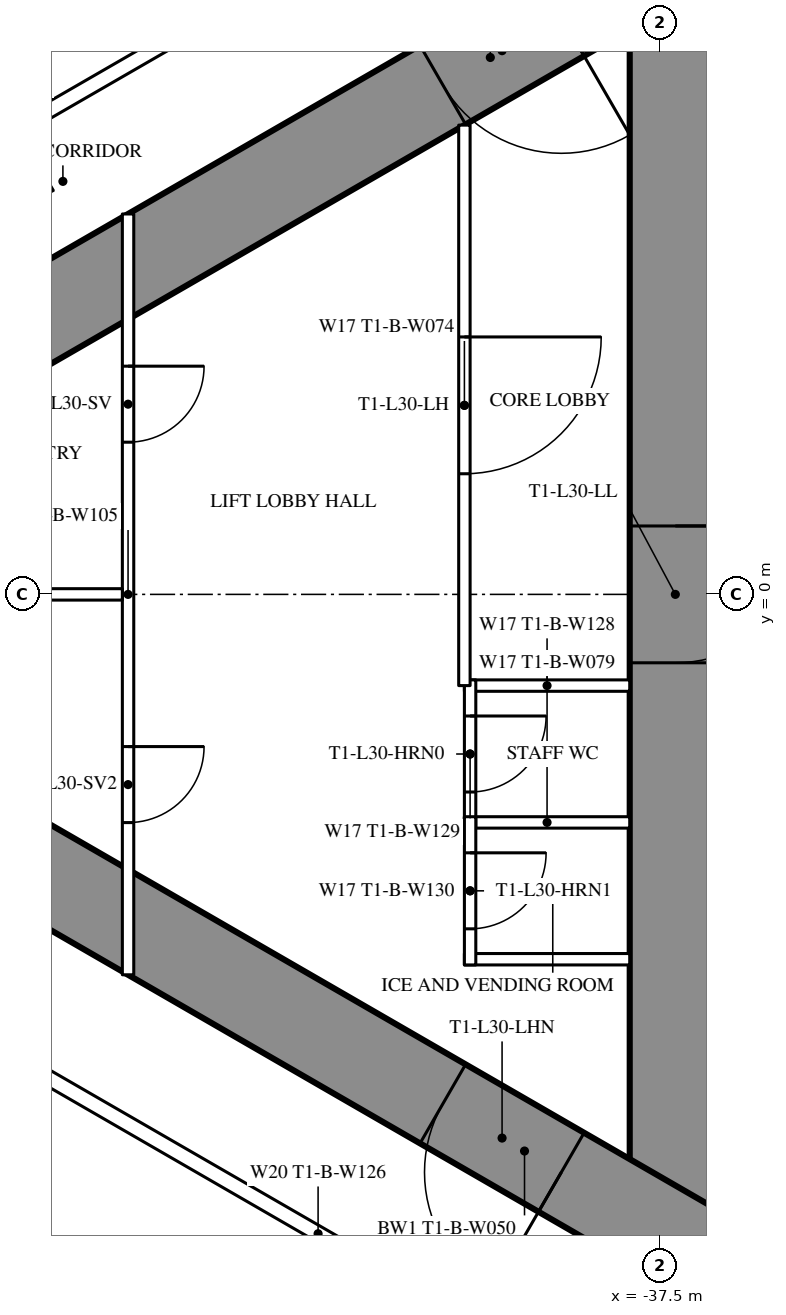
"""IFC4 building model, lengths in metres.
Left out: names, types, materials, properties, quantities, classifications, styles, units other than length and angle.
Written with IfcOpenShell. Run it as: python <this file> out.ifc"""

import sys

from ifc_helpers import new_model, si_unit, direction, frame, frame_2d, origin, place, context, subcontext, project, spatial, rectangle, extrude, element, fill, save


model = new_model("IFC4")
c1 = context("Model", 3, precision=1e-05, world=origin(), true_north=direction((0.0, 1.0)))
c2 = subcontext(c1, "Body", "Model", "MODEL_VIEW")
j1 = project(units=[si_unit("LENGTHUNIT", "METRE"), si_unit("PLANEANGLEUNIT", "RADIAN")], contexts=[c1])
p1 = place(None, origin())
s1 = spatial("IfcSite", under=j1, at=p1, CompositionType="ELEMENT")
p2 = place(p1, origin())
s2 = spatial("IfcBuilding", under=s1, at=p2, CompositionType="ELEMENT")
p3 = place(p2, frame((0.0, 0.0, 115.1)))
s3 = spatial("IfcBuildingStorey", under=s2, at=p3, CompositionType="ELEMENT", Elevation=115.1)
p4 = place(p3, frame((-37.3, 8.6, 0.0), z_axis=(0.0, 0.0, 1.0), x_axis=(0.0, -1.0, 0.0)))
e1 = element("IfcWall", 1, at=p4, inside=s3, PredefinedType="SHEAR", context=c2, shape_type="SweptSolid", body=[
    extrude(rectangle(XDim=17.2, YDim=1.2, at=frame_2d((8.6, 0.0))), origin(), (0.0, 0.0, 1.0), 3.5),
])
p5 = place(p4, frame((7.7, 0.0, 0.0)))
e2 = element("IfcOpeningElement", 2, at=p5, cuts=e1, PredefinedType="OPENING", context=c2, shape_type="SweptSolid", body=[
    extrude(rectangle(XDim=1.8, YDim=2.2, at=frame_2d((0.9, 1.1))), frame((0.0, 0.61, 0.0), z_axis=(0.0, -1.0, 0.0), x_axis=(1.0, 0.0, 0.0)), (0.0, 0.0, 1.0), 1.22),
])
p6 = place(p3, frame((-27.2, 14.3, 0.0), z_axis=(0.0, 0.0, 1.0), x_axis=(-0.866026593062, -0.499997940104, 0.0)))
e3 = element("IfcWall", 3, at=p6, inside=s3, PredefinedType="SHEAR", context=c2, shape_type="SweptSolid", body=[
    extrude(rectangle(XDim=28.946, YDim=1.2, at=frame_2d((14.473, 0.0))), origin(), (0.0, 0.0, 1.0), 3.5),
])
p7 = place(p6, frame((4.6, 0.0, 0.0)))
e4 = element("IfcOpeningElement", 4, at=p7, cuts=e3, PredefinedType="OPENING", context=c2, shape_type="SweptSolid", body=[
    extrude(rectangle(XDim=1.0, YDim=2.2, at=frame_2d((0.5, 1.1))), frame((0.0, 0.61, 0.0), z_axis=(0.0, -1.0, 0.0), x_axis=(1.0, 0.0, 0.0)), (0.0, 0.0, 1.0), 1.22),
])
p8 = place(p6, frame((13.395, 0.0, 0.0)))
e5 = element("IfcOpeningElement", 5, at=p8, cuts=e3, PredefinedType="OPENING", context=c2, shape_type="SweptSolid", body=[
    extrude(rectangle(XDim=1.8, YDim=2.2, at=frame_2d((0.9, 1.1))), frame((0.0, 0.61, 0.0), z_axis=(0.0, -1.0, 0.0), x_axis=(1.0, 0.0, 0.0)), (0.0, 0.0, 1.0), 1.22),
])
p9 = place(p3, frame((-27.2, -14.3, 0.0), z_axis=(0.0, 0.0, 1.0), x_axis=(-0.866024021859, 0.500002393557, 0.0)))
e6 = element("IfcWall", 6, at=p9, inside=s3, PredefinedType="SHEAR", context=c2, shape_type="SweptSolid", body=[
    extrude(rectangle(XDim=27.907, YDim=1.2, at=frame_2d((13.954, 0.0))), origin(), (0.0, 0.0, 1.0), 3.5),
])
p10 = place(p9, frame((4.6, 0.0, 0.0)))
e7 = element("IfcOpeningElement", 7, at=p10, cuts=e6, PredefinedType="OPENING", context=c2, shape_type="SweptSolid", body=[
    extrude(rectangle(XDim=1.0, YDim=2.2, at=frame_2d((0.5, 1.1))), frame((0.0, 0.61, 0.0), z_axis=(0.0, -1.0, 0.0), x_axis=(1.0, 0.0, 0.0)), (0.0, 0.0, 1.0), 1.22),
])
p11 = place(p9, frame((13.395, 0.0, 0.0)))
e8 = element("IfcOpeningElement", 8, at=p11, cuts=e6, PredefinedType="OPENING", context=c2, shape_type="SweptSolid", body=[
    extrude(rectangle(XDim=1.8, YDim=2.2, at=frame_2d((0.9, 1.1))), frame((0.0, 0.61, 0.0), z_axis=(0.0, -1.0, 0.0), x_axis=(1.0, 0.0, 0.0)), (0.0, 0.0, 1.0), 1.22),
])
p12 = place(p3, frame((-37.7, 10.894, 0.0), z_axis=(0.0, 0.0, 1.0), x_axis=(-0.866027905338, -0.499995667157, 0.0)))
e9 = element("IfcWall", 9, at=p12, inside=s3, PredefinedType="PARTITIONING", context=c2, shape_type="SweptSolid", body=[
    extrude(rectangle(XDim=21.787, YDim=0.2, at=frame_2d((10.894, 0.0))), origin(), (0.0, 0.0, 1.0), 3.25),
])
p13 = place(p12, frame((11.23, 0.0, 0.0)))
e10 = element("IfcOpeningElement", 10, at=p13, cuts=e9, PredefinedType="OPENING", context=c2, shape_type="SweptSolid", body=[
    extrude(rectangle(XDim=0.95, YDim=2.2, at=frame_2d((0.475, 1.1))), frame((0.0, 0.11, 0.0), z_axis=(0.0, -1.0, 0.0), x_axis=(1.0, 0.0, 0.0)), (0.0, 0.0, 1.0), 0.22),
])
p14 = place(p12, frame((9.531, 0.0, 0.0)))
e11 = element("IfcOpeningElement", 11, at=p14, cuts=e9, PredefinedType="OPENING", context=c2, shape_type="SweptSolid", body=[
    extrude(rectangle(XDim=0.95, YDim=2.2, at=frame_2d((0.475, 1.1))), frame((0.0, 0.11, 0.0), z_axis=(0.0, -1.0, 0.0), x_axis=(1.0, 0.0, 0.0)), (0.0, 0.0, 1.0), 0.22),
])
p15 = place(p3, frame((-36.92, -11.344, 0.0), z_axis=(0.0, 0.0, 1.0), x_axis=(-0.866027897759, 0.499995680284, 0.0)))
e12 = element("IfcWall", 12, at=p15, inside=s3, PredefinedType="PARTITIONING", context=c2, shape_type="SweptSolid", body=[
    extrude(rectangle(XDim=11.731, YDim=0.2, at=frame_2d((5.865, 0.0))), origin(), (0.0, 0.0, 1.0), 3.25),
])
p16 = place(p15, frame((3.35, 0.0, 0.0)))
e13 = element("IfcOpeningElement", 13, at=p16, cuts=e12, PredefinedType="OPENING", context=c2, shape_type="SweptSolid", body=[
    extrude(rectangle(XDim=1.0, YDim=2.2, at=frame_2d((0.5, 1.1))), frame((0.0, 0.11, 0.0), z_axis=(0.0, -1.0, 0.0), x_axis=(1.0, 0.0, 0.0)), (0.0, 0.0, 1.0), 0.22),
])
for number, where, z_axis, x_axis in (
    (14, (-37.9, -1.2, 0.0), (0.0, 0.0, 1.0), (-1.0, 0.0, 0.0)),
    (15, (-37.9, -3.0, 0.0), (0.0, 0.0, 1.0), (-1.0, 0.0, 0.0)),
    (16, (-37.9, -4.8, 0.0), (0.0, 0.0, 1.0), (-1.0, 0.0, 0.0)),
):
    element("IfcWall", number, at=place(p3, frame(where, z_axis=z_axis, x_axis=x_axis)), inside=s3, PredefinedType="PARTITIONING", context=c2, shape_type="SweptSolid", body=[
        extrude(rectangle(XDim=2.175, YDim=0.15, at=frame_2d((1.087, 0.0))), origin(), (0.0, 0.0, 1.0), 3.25),
    ])
p17 = place(p3, frame((-40.0, -1.125, 0.0), z_axis=(0.0, 0.0, 1.0), x_axis=(0.0, -1.0, 0.0)))
e17 = element("IfcWall", 17, at=p17, inside=s3, PredefinedType="PARTITIONING", context=c2, shape_type="SweptSolid", body=[
    extrude(rectangle(XDim=1.95, YDim=0.15, at=frame_2d((0.975, 0.0))), origin(), (0.0, 0.0, 1.0), 3.25),
])
p18 = place(p17, frame((0.475, 0.0, 0.0)))
e18 = element("IfcOpeningElement", 18, at=p18, cuts=e17, PredefinedType="OPENING", context=c2, shape_type="SweptSolid", body=[
    extrude(rectangle(XDim=1.0, YDim=2.2, at=frame_2d((0.5, 1.1))), frame((0.0, 0.085, 0.0), z_axis=(0.0, -1.0, 0.0), x_axis=(1.0, 0.0, 0.0)), (0.0, 0.0, 1.0), 0.17),
])
p19 = place(p3, frame((-40.0, -2.925, 0.0), z_axis=(0.0, 0.0, 1.0), x_axis=(0.0, -1.0, 0.0)))
e19 = element("IfcWall", 19, at=p19, inside=s3, PredefinedType="PARTITIONING", context=c2, shape_type="SweptSolid", body=[
    extrude(rectangle(XDim=1.95, YDim=0.15, at=frame_2d((0.975, 0.0))), origin(), (0.0, 0.0, 1.0), 3.25),
])
p20 = place(p19, frame((0.475, 0.0, 0.0)))
e20 = element("IfcOpeningElement", 20, at=p20, cuts=e19, PredefinedType="OPENING", context=c2, shape_type="SweptSolid", body=[
    extrude(rectangle(XDim=1.0, YDim=2.2, at=frame_2d((0.5, 1.1))), frame((0.0, 0.085, 0.0), z_axis=(0.0, -1.0, 0.0), x_axis=(1.0, 0.0, 0.0)), (0.0, 0.0, 1.0), 0.17),
])
p21 = place(p3, frame((-40.075, 6.174, 0.0), z_axis=(0.0, 0.0, 1.0), x_axis=(0.0, -1.0, 0.0)))
e21 = element("IfcWall", 21, at=p21, inside=s3, PredefinedType="PARTITIONING", context=c2, shape_type="SweptSolid", body=[
    extrude(rectangle(XDim=7.374, YDim=0.15, at=frame_2d((3.687, 0.0))), origin(), (0.0, 0.0, 1.0), 3.25),
])
p22 = place(p21, frame((2.787, 0.0, 0.0)))
e22 = element("IfcOpeningElement", 22, at=p22, cuts=e21, PredefinedType="OPENING", context=c2, shape_type="SweptSolid", body=[
    extrude(rectangle(XDim=1.8, YDim=2.2, at=frame_2d((0.9, 1.1))), frame((0.0, 0.085, 0.0), z_axis=(0.0, -1.0, 0.0), x_axis=(1.0, 0.0, 0.0)), (0.0, 0.0, 1.0), 0.17),
])
p23 = place(p3, frame((-44.5, 5.005, 0.0), z_axis=(0.0, 0.0, 1.0), x_axis=(0.0, -1.0, 0.0)))
e23 = element("IfcWall", 23, at=p23, inside=s3, PredefinedType="PARTITIONING", context=c2, shape_type="SweptSolid", body=[
    extrude(rectangle(XDim=10.009, YDim=0.15, at=frame_2d((5.005, 0.0))), origin(), (0.0, 0.0, 1.0), 2.45),
])
p24 = place(p23, frame((2.002, 0.0, 0.0)))
e24 = element("IfcOpeningElement", 24, at=p24, cuts=e23, PredefinedType="OPENING", context=c2, shape_type="SweptSolid", body=[
    extrude(rectangle(XDim=1.0, YDim=2.2, at=frame_2d((0.5, 1.1))), frame((0.0, 0.085, 0.0), z_axis=(0.0, -1.0, 0.0), x_axis=(1.0, 0.0, 0.0)), (0.0, 0.0, 1.0), 0.17),
])
p25 = place(p23, frame((7.007, 0.0, 0.0)))
e25 = element("IfcOpeningElement", 25, at=p25, cuts=e23, PredefinedType="OPENING", context=c2, shape_type="SweptSolid", body=[
    extrude(rectangle(XDim=1.0, YDim=2.2, at=frame_2d((0.5, 1.1))), frame((0.0, 0.085, 0.0), z_axis=(0.0, -1.0, 0.0), x_axis=(1.0, 0.0, 0.0)), (0.0, 0.0, 1.0), 0.17),
])
p26 = place(p3, frame((-44.575, 0.0, 0.0), z_axis=(0.0, 0.0, 1.0), x_axis=(-1.0, 0.0, 0.0)))
e26 = element("IfcWall", 26, at=p26, inside=s3, PredefinedType="PARTITIONING", context=c2, shape_type="SweptSolid", body=[
    extrude(rectangle(XDim=8.593, YDim=0.15, at=frame_2d((4.297, 0.0))), origin(), (0.0, 0.0, 1.0), 2.2),
])
p27 = place(p18, origin())
e27 = element("IfcDoor", 27, at=p27, inside=s3, OperationType="SINGLE_SWING_LEFT", PredefinedType="DOOR", context=c2, shape_type="SweptSolid", body=[
    extrude(rectangle(XDim=1.0, YDim=2.2, at=frame_2d((0.5, 1.1))), frame((0.0, 0.025, 0.0), z_axis=(0.0, -1.0, 0.0), x_axis=(1.0, 0.0, 0.0)), (0.0, 0.0, 1.0), 0.05),
])
fill(e18, e27)
p28 = place(p20, origin())
e28 = element("IfcDoor", 28, at=p28, inside=s3, OperationType="SINGLE_SWING_LEFT", PredefinedType="DOOR", context=c2, shape_type="SweptSolid", body=[
    extrude(rectangle(XDim=1.0, YDim=2.2, at=frame_2d((0.5, 1.1))), frame((0.0, 0.025, 0.0), z_axis=(0.0, -1.0, 0.0), x_axis=(1.0, 0.0, 0.0)), (0.0, 0.0, 1.0), 0.05),
])
fill(e20, e28)
p29 = place(p22, origin())
e29 = element("IfcDoor", 29, at=p29, inside=s3, OperationType="DOUBLE_DOOR_SINGLE_SWING", PredefinedType="DOOR", context=c2, shape_type="SweptSolid", body=[
    extrude(rectangle(XDim=1.8, YDim=2.2, at=frame_2d((0.9, 1.1))), frame((0.0, 0.025, 0.0), z_axis=(0.0, -1.0, 0.0), x_axis=(1.0, 0.0, 0.0)), (0.0, 0.0, 1.0), 0.05),
])
fill(e22, e29)
p30 = place(p24, origin())
e30 = element("IfcDoor", 30, at=p30, inside=s3, OperationType="SINGLE_SWING_LEFT", PredefinedType="DOOR", context=c2, shape_type="SweptSolid", body=[
    extrude(rectangle(XDim=1.0, YDim=2.2, at=frame_2d((0.5, 1.1))), frame((0.0, 0.025, 0.0), z_axis=(0.0, -1.0, 0.0), x_axis=(1.0, 0.0, 0.0)), (0.0, 0.0, 1.0), 0.05),
])
fill(e24, e30)
p31 = place(p25, origin())
e31 = element("IfcDoor", 31, at=p31, inside=s3, OperationType="SINGLE_SWING_LEFT", PredefinedType="DOOR", context=c2, shape_type="SweptSolid", body=[
    extrude(rectangle(XDim=1.0, YDim=2.2, at=frame_2d((0.5, 1.1))), frame((0.0, 0.025, 0.0), z_axis=(0.0, -1.0, 0.0), x_axis=(1.0, 0.0, 0.0)), (0.0, 0.0, 1.0), 0.05),
])
fill(e25, e31)
p32 = place(p8, origin())
e32 = element("IfcDoor", 32, at=p32, inside=s3, OperationType="DOUBLE_DOOR_SINGLE_SWING", PredefinedType="DOOR", context=c2, shape_type="SweptSolid", body=[
    extrude(rectangle(XDim=1.8, YDim=2.2, at=frame_2d((0.9, 1.1))), frame((0.0, 0.025, 0.0), z_axis=(0.0, -1.0, 0.0), x_axis=(1.0, 0.0, 0.0)), (0.0, 0.0, 1.0), 0.05),
])
fill(e5, e32)
p33 = place(p11, origin())
e33 = element("IfcDoor", 33, at=p33, inside=s3, OperationType="DOUBLE_DOOR_SINGLE_SWING", PredefinedType="DOOR", context=c2, shape_type="SweptSolid", body=[
    extrude(rectangle(XDim=1.8, YDim=2.2, at=frame_2d((0.9, 1.1))), frame((0.0, 0.025, 0.0), z_axis=(0.0, -1.0, 0.0), x_axis=(1.0, 0.0, 0.0)), (0.0, 0.0, 1.0), 0.05),
])
fill(e8, e33)
p34 = place(p5, origin())
e34 = element("IfcDoor", 34, at=p34, inside=s3, OperationType="DOUBLE_DOOR_SINGLE_SWING", PredefinedType="DOOR", context=c2, shape_type="SweptSolid", body=[
    extrude(rectangle(XDim=1.8, YDim=2.2, at=frame_2d((0.9, 1.1))), frame((0.0, 0.025, 0.0), z_axis=(0.0, -1.0, 0.0), x_axis=(1.0, 0.0, 0.0)), (0.0, 0.0, 1.0), 0.05),
])
fill(e2, e34)
save(model, sys.argv[1])
